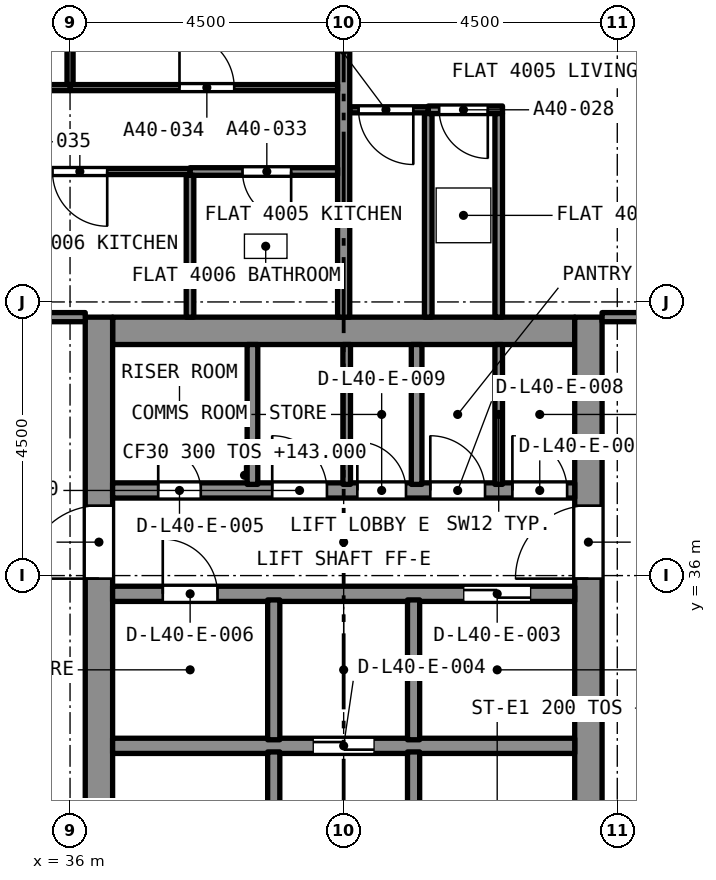
"""IFC4 building model, lengths in metres.
Left out: names, types, materials, properties, quantities, classifications, styles, units other than length and angle.
Written with IfcOpenShell. Run it as: python <this file> out.ifc"""

import sys

from ifc_helpers import new_model, si_unit, direction, frame, frame_2d, origin, place, context, subcontext, project, spatial, rectangle, extrude, element, fill, save


model = new_model("IFC4")
c1 = context("Model", 3, precision=1e-05, world=origin(), true_north=direction((0.0, 1.0)))
c2 = subcontext(c1, "Body", "Model", "MODEL_VIEW")
j1 = project(units=[si_unit("LENGTHUNIT", "METRE"), si_unit("PLANEANGLEUNIT", "RADIAN")], contexts=[c1])
p1 = place(None, origin())
s1 = spatial("IfcSite", under=j1, at=p1, CompositionType="ELEMENT")
p2 = place(p1, origin())
s2 = spatial("IfcBuilding", under=s1, at=p2, CompositionType="ELEMENT")
p3 = place(p2, frame((0.0, 0.0, 143.0)))
s3 = spatial("IfcBuildingStorey", under=s2, at=p3, CompositionType="ELEMENT", Elevation=143.0)
p4 = place(p3, frame((36.7, 40.025, 0.0), z_axis=(0.0, 0.0, 1.0), x_axis=(1.0, 0.0, 0.0)))
e1 = element("IfcWall", 1, at=p4, inside=s3, PredefinedType="SOLIDWALL", context=c2, shape_type="SweptSolid", body=[
    extrude(rectangle(XDim=7.6, YDim=0.45, at=frame_2d((3.8, 0.0))), origin(), (0.0, 0.0, 1.0), 3.2),
])
p5 = place(p3, frame((36.475, 27.25, 0.0), z_axis=(0.0, 0.0, 1.0), x_axis=(0.0, 1.0, 0.0)))
e2 = element("IfcWall", 2, at=p5, inside=s3, PredefinedType="SOLIDWALL", context=c2, shape_type="SweptSolid", body=[
    extrude(rectangle(XDim=13.0, YDim=0.45, at=frame_2d((6.5, 0.0))), origin(), (0.0, 0.0, 1.0), 3.2),
])
p6 = place(p5, frame((8.7, 0.0, 0.0)))
e3 = element("IfcOpeningElement", 3, at=p6, cuts=e2, PredefinedType="OPENING", context=c2, shape_type="SweptSolid", body=[
    extrude(rectangle(XDim=1.2, YDim=2.1, at=frame_2d((0.6, 1.05))), frame((0.0, 0.235, 0.0), z_axis=(0.0, -1.0, 0.0), x_axis=(1.0, 0.0, 0.0)), (0.0, 0.0, 1.0), 0.47),
])
p7 = place(p3, frame((44.525, 27.25, 0.0), z_axis=(0.0, 0.0, 1.0), x_axis=(0.0, 1.0, 0.0)))
e4 = element("IfcWall", 4, at=p7, inside=s3, PredefinedType="SOLIDWALL", context=c2, shape_type="SweptSolid", body=[
    extrude(rectangle(XDim=13.0, YDim=0.45, at=frame_2d((6.5, 0.0))), origin(), (0.0, 0.0, 1.0), 3.2),
])
p8 = place(p7, frame((8.7, 0.0, 0.0)))
e5 = element("IfcOpeningElement", 5, at=p8, cuts=e4, PredefinedType="OPENING", context=c2, shape_type="SweptSolid", body=[
    extrude(rectangle(XDim=1.2, YDim=2.1, at=frame_2d((0.6, 1.05))), frame((0.0, 0.235, 0.0), z_axis=(0.0, -1.0, 0.0), x_axis=(1.0, 0.0, 0.0)), (0.0, 0.0, 1.0), 0.47),
])
p9 = place(p3, frame((43.113, 43.66, 0.0), z_axis=(0.0, 0.0, 1.0), x_axis=(-1.0, 0.0, 0.0)))
e6 = element("IfcWall", 6, at=p9, inside=s3, PredefinedType="PARTITIONING", context=c2, shape_type="SweptSolid", body=[
    extrude(rectangle(XDim=1.222, YDim=0.125, at=frame_2d((0.611, 0.0))), origin(), (0.0, 0.0, 1.0), 2.9),
])
p10 = place(p9, frame((0.242, 0.0, 0.0)))
e7 = element("IfcOpeningElement", 7, at=p10, cuts=e6, PredefinedType="OPENING", context=c2, shape_type="SweptSolid", body=[
    extrude(rectangle(XDim=0.8, YDim=2.1, at=frame_2d((0.4, 1.05))), frame((0.0, 0.073, 0.0), z_axis=(0.0, -1.0, 0.0), x_axis=(1.0, 0.0, 0.0)), (0.0, 0.0, 1.0), 0.145),
])
for number, where, z_axis, x_axis in (
    (8, (43.05, 40.25, 0.0), (0.0, 0.0, 1.0), (0.0, 1.0, 0.0)),
    (9, (41.891, 40.25, 0.0), (0.0, 0.0, 1.0), (0.0, 1.0, 0.0)),
):
    element("IfcWall", number, at=place(p3, frame(where, z_axis=z_axis, x_axis=x_axis)), inside=s3, PredefinedType="PARTITIONING", context=c2, shape_type="SweptSolid", body=[
        extrude(rectangle(XDim=3.347, YDim=0.125, at=frame_2d((1.674, 0.0))), origin(), (0.0, 0.0, 1.0), 2.9),
    ])
p11 = place(p3, frame((41.891, 43.66, 0.0), z_axis=(0.0, 0.0, 1.0), x_axis=(-1.0, 0.0, 0.0)))
e10 = element("IfcWall", 10, at=p11, inside=s3, PredefinedType="PARTITIONING", context=c2, shape_type="SweptSolid", body=[
    extrude(rectangle(XDim=1.291, YDim=0.1, at=frame_2d((0.646, 0.0))), origin(), (0.0, 0.0, 1.0), 2.9),
])
p12 = place(p11, frame((0.246, 0.0, 0.0)))
e11 = element("IfcOpeningElement", 11, at=p12, cuts=e10, PredefinedType="OPENING", context=c2, shape_type="SweptSolid", body=[
    extrude(rectangle(XDim=0.9, YDim=2.1, at=frame_2d((0.45, 1.05))), frame((0.0, 0.06, 0.0), z_axis=(0.0, -1.0, 0.0), x_axis=(1.0, 0.0, 0.0)), (0.0, 0.0, 1.0), 0.12),
])
p13 = place(p3, frame((44.75, 40.25, 0.0), z_axis=(0.0, 0.0, 1.0), x_axis=(1.0, 0.0, 0.0)))
e12 = element("IfcWall", 12, at=p13, inside=s3, PredefinedType="PARTITIONING", context=c2, shape_type="SweptSolid", body=[
    extrude(rectangle(XDim=4.275, YDim=0.15, at=frame_2d((2.137, 0.0))), origin(), (0.0, 0.0, 1.0), 2.9),
])
p14 = place(p13, frame((2.0, 0.0, 0.0)))
e13 = element("IfcOpeningElement", 13, at=p14, cuts=e12, PredefinedType="OPENING", context=c2, shape_type="SweptSolid", body=[
    extrude(rectangle(XDim=1.0, YDim=2.1, at=frame_2d((0.5, 1.05))), frame((0.0, 0.085, 0.0), z_axis=(0.0, -1.0, 0.0), x_axis=(1.0, 0.0, 0.0)), (0.0, 0.0, 1.0), 0.17),
])
p15 = place(p3, frame((40.5, 40.25, 0.0), z_axis=(0.0, 0.0, 1.0), x_axis=(0.0, 1.0, 0.0)))
e14 = element("IfcWall", 14, at=p15, inside=s3, PredefinedType="PARTITIONING", context=c2, shape_type="SweptSolid", body=[
    extrude(rectangle(XDim=8.775, YDim=0.2, at=frame_2d((4.387, 0.0))), origin(), (0.0, 0.0, 1.0), 2.9),
])
p16 = place(p3, frame((40.4, 42.645, 0.0), z_axis=(0.0, 0.0, 1.0), x_axis=(-1.0, 0.0, 0.0)))
e15 = element("IfcWall", 15, at=p16, inside=s3, PredefinedType="PARTITIONING", context=c2, shape_type="SweptSolid", body=[
    extrude(rectangle(XDim=2.427, YDim=0.125, at=frame_2d((1.214, 0.0))), origin(), (0.0, 0.0, 1.0), 2.9),
])
p17 = place(p16, frame((0.764, 0.0, 0.0)))
e16 = element("IfcOpeningElement", 16, at=p17, cuts=e15, PredefinedType="OPENING", context=c2, shape_type="SweptSolid", body=[
    extrude(rectangle(XDim=0.8, YDim=2.1, at=frame_2d((0.4, 1.05))), frame((0.0, 0.073, 0.0), z_axis=(0.0, -1.0, 0.0), x_axis=(1.0, 0.0, 0.0)), (0.0, 0.0, 1.0), 0.145),
])
p18 = place(p3, frame((37.973, 40.25, 0.0), z_axis=(0.0, 0.0, 1.0), x_axis=(0.0, 1.0, 0.0)))
e17 = element("IfcWall", 17, at=p18, inside=s3, PredefinedType="PARTITIONING", context=c2, shape_type="SweptSolid", body=[
    extrude(rectangle(XDim=2.333, YDim=0.125, at=frame_2d((1.166, 0.0))), origin(), (0.0, 0.0, 1.0), 2.9),
])
p19 = place(p3, frame((36.0, 44.025, 0.0), z_axis=(0.0, 0.0, 1.0), x_axis=(1.0, 0.0, 0.0)))
e18 = element("IfcWall", 18, at=p19, inside=s3, PredefinedType="PARTITIONING", context=c2, shape_type="SweptSolid", body=[
    extrude(rectangle(XDim=4.4, YDim=0.1, at=frame_2d((2.2, 0.0))), origin(), (0.0, 0.0, 1.0), 2.9),
])
p20 = place(p19, frame((1.8, 0.0, 0.0)))
e19 = element("IfcOpeningElement", 19, at=p20, cuts=e18, PredefinedType="OPENING", context=c2, shape_type="SweptSolid", body=[
    extrude(rectangle(XDim=0.9, YDim=2.1, at=frame_2d((0.45, 1.05))), frame((0.0, 0.06, 0.0), z_axis=(0.0, -1.0, 0.0), x_axis=(1.0, 0.0, 0.0)), (0.0, 0.0, 1.0), 0.12),
])
p21 = place(p3, frame((36.0, 44.075, 0.0), z_axis=(0.0, 0.0, 1.0), x_axis=(0.0, 1.0, 0.0)))
e20 = element("IfcWall", 20, at=p21, inside=s3, PredefinedType="PARTITIONING", context=c2, shape_type="SweptSolid", body=[
    extrude(rectangle(XDim=4.95, YDim=0.1, at=frame_2d((2.475, 0.0))), origin(), (0.0, 0.0, 1.0), 2.9),
])
p22 = place(p3, frame((37.973, 42.645, 0.0), z_axis=(0.0, 0.0, 1.0), x_axis=(-1.0, 0.0, 0.0)))
e21 = element("IfcWall", 21, at=p22, inside=s3, PredefinedType="PARTITIONING", context=c2, shape_type="SweptSolid", body=[
    extrude(rectangle(XDim=3.673, YDim=0.1, at=frame_2d((1.836, 0.0))), origin(), (0.0, 0.0, 1.0), 2.9),
])
p23 = place(p22, frame((1.361, 0.0, 0.0)))
e22 = element("IfcOpeningElement", 22, at=p23, cuts=e21, PredefinedType="OPENING", context=c2, shape_type="SweptSolid", body=[
    extrude(rectangle(XDim=0.9, YDim=2.1, at=frame_2d((0.45, 1.05))), frame((0.0, 0.06, 0.0), z_axis=(0.0, -1.0, 0.0), x_axis=(1.0, 0.0, 0.0)), (0.0, 0.0, 1.0), 0.12),
])
p24 = place(p3, frame((31.625, 44.025, 0.0), z_axis=(0.0, 0.0, 1.0), x_axis=(1.0, 0.0, 0.0)))
e23 = element("IfcWall", 23, at=p24, inside=s3, PredefinedType="PARTITIONING", context=c2, shape_type="SweptSolid", body=[
    extrude(rectangle(XDim=4.375, YDim=0.1, at=frame_2d((2.188, 0.0))), origin(), (0.0, 0.0, 1.0), 2.9),
])
p25 = place(p24, frame((1.625, 0.0, 0.0)))
e24 = element("IfcOpeningElement", 24, at=p25, cuts=e23, PredefinedType="OPENING", context=c2, shape_type="SweptSolid", body=[
    extrude(rectangle(XDim=1.0, YDim=2.1, at=frame_2d((0.5, 1.05))), frame((0.0, 0.06, 0.0), z_axis=(0.0, -1.0, 0.0), x_axis=(1.0, 0.0, 0.0)), (0.0, 0.0, 1.0), 0.12),
])
p26 = place(p3, frame((34.35, 40.25, 0.0), z_axis=(0.0, 0.0, 1.0), x_axis=(1.0, 0.0, 0.0)))
e25 = element("IfcWall", 25, at=p26, inside=s3, PredefinedType="PARTITIONING", context=c2, shape_type="SweptSolid", body=[
    extrude(rectangle(XDim=1.9, YDim=0.15, at=frame_2d((0.95, 0.0))), origin(), (0.0, 0.0, 1.0), 2.9),
])
p27 = place(p3, frame((36.7, 33.2, 0.0), z_axis=(0.0, 0.0, 1.0), x_axis=(1.0, 0.0, 0.0)))
e26 = element("IfcWall", 26, at=p27, inside=s3, PredefinedType="SOLIDWALL", context=c2, shape_type="SweptSolid", body=[
    extrude(rectangle(XDim=7.6, YDim=0.25, at=frame_2d((3.8, 0.0))), origin(), (0.0, 0.0, 1.0), 2.9),
])
p28 = place(p27, frame((3.3, 0.0, 0.0)))
e27 = element("IfcOpeningElement", 27, at=p28, cuts=e26, PredefinedType="OPENING", context=c2, shape_type="SweptSolid", body=[
    extrude(rectangle(XDim=1.0, YDim=2.1, at=frame_2d((0.5, 1.05))), frame((0.0, 0.135, 0.0), z_axis=(0.0, -1.0, 0.0), x_axis=(1.0, 0.0, 0.0)), (0.0, 0.0, 1.0), 0.27),
])
p29 = place(p3, frame((36.7, 35.7, 0.0), z_axis=(0.0, 0.0, 1.0), x_axis=(1.0, 0.0, 0.0)))
e28 = element("IfcWall", 28, at=p29, inside=s3, PredefinedType="SOLIDWALL", context=c2, shape_type="SweptSolid", body=[
    extrude(rectangle(XDim=7.6, YDim=0.25, at=frame_2d((3.8, 0.0))), origin(), (0.0, 0.0, 1.0), 2.9),
])
p30 = place(p29, frame((5.775, 0.0, 0.0)))
e29 = element("IfcOpeningElement", 29, at=p30, cuts=e28, PredefinedType="OPENING", context=c2, shape_type="SweptSolid", body=[
    extrude(rectangle(XDim=1.1, YDim=2.4, at=frame_2d((0.55, 1.2))), frame((0.0, 0.135, 0.0), z_axis=(0.0, -1.0, 0.0), x_axis=(1.0, 0.0, 0.0)), (0.0, 0.0, 1.0), 0.27),
])
p31 = place(p29, frame((0.825, 0.0, 0.0)))
e30 = element("IfcOpeningElement", 30, at=p31, cuts=e28, PredefinedType="OPENING", context=c2, shape_type="SweptSolid", body=[
    extrude(rectangle(XDim=0.9, YDim=2.1, at=frame_2d((0.45, 1.05))), frame((0.0, 0.135, 0.0), z_axis=(0.0, -1.0, 0.0), x_axis=(1.0, 0.0, 0.0)), (0.0, 0.0, 1.0), 0.27),
])
p32 = place(p3, frame((36.7, 37.4, 0.0), z_axis=(0.0, 0.0, 1.0), x_axis=(1.0, 0.0, 0.0)))
e31 = element("IfcWall", 31, at=p32, inside=s3, PredefinedType="SOLIDWALL", context=c2, shape_type="SweptSolid", body=[
    extrude(rectangle(XDim=7.6, YDim=0.25, at=frame_2d((3.8, 0.0))), origin(), (0.0, 0.0, 1.0), 2.9),
])
p33 = place(p32, frame((0.75, 0.0, 0.0)))
e32 = element("IfcOpeningElement", 32, at=p33, cuts=e31, PredefinedType="OPENING", context=c2, shape_type="SweptSolid", body=[
    extrude(rectangle(XDim=0.7, YDim=2.1, at=frame_2d((0.35, 1.05))), frame((0.0, 0.135, 0.0), z_axis=(0.0, -1.0, 0.0), x_axis=(1.0, 0.0, 0.0)), (0.0, 0.0, 1.0), 0.27),
])
p34 = place(p32, frame((6.575, 0.0, 0.0)))
e33 = element("IfcOpeningElement", 33, at=p34, cuts=e31, PredefinedType="OPENING", context=c2, shape_type="SweptSolid", body=[
    extrude(rectangle(XDim=0.9, YDim=2.1, at=frame_2d((0.45, 1.05))), frame((0.0, 0.135, 0.0), z_axis=(0.0, -1.0, 0.0), x_axis=(1.0, 0.0, 0.0)), (0.0, 0.0, 1.0), 0.27),
])
p35 = place(p32, frame((5.225, 0.0, 0.0)))
e34 = element("IfcOpeningElement", 34, at=p35, cuts=e31, PredefinedType="OPENING", context=c2, shape_type="SweptSolid", body=[
    extrude(rectangle(XDim=0.9, YDim=2.1, at=frame_2d((0.45, 1.05))), frame((0.0, 0.135, 0.0), z_axis=(0.0, -1.0, 0.0), x_axis=(1.0, 0.0, 0.0)), (0.0, 0.0, 1.0), 0.27),
])
p36 = place(p32, frame((4.025, 0.0, 0.0)))
e35 = element("IfcOpeningElement", 35, at=p36, cuts=e31, PredefinedType="OPENING", context=c2, shape_type="SweptSolid", body=[
    extrude(rectangle(XDim=0.8, YDim=2.1, at=frame_2d((0.4, 1.05))), frame((0.0, 0.135, 0.0), z_axis=(0.0, -1.0, 0.0), x_axis=(1.0, 0.0, 0.0)), (0.0, 0.0, 1.0), 0.27),
])
p37 = place(p32, frame((2.625, 0.0, 0.0)))
e36 = element("IfcOpeningElement", 36, at=p37, cuts=e31, PredefinedType="OPENING", context=c2, shape_type="SweptSolid", body=[
    extrude(rectangle(XDim=0.9, YDim=2.1, at=frame_2d((0.45, 1.05))), frame((0.0, 0.135, 0.0), z_axis=(0.0, -1.0, 0.0), x_axis=(1.0, 0.0, 0.0)), (0.0, 0.0, 1.0), 0.27),
])
p38 = place(p3, frame((41.65, 27.7, 0.0), z_axis=(0.0, 0.0, 1.0), x_axis=(0.0, 1.0, 0.0)))
e37 = element("IfcWall", 37, at=p38, inside=s3, PredefinedType="SOLIDWALL", context=c2, shape_type="SweptSolid", body=[
    extrude(rectangle(XDim=5.4, YDim=0.2, at=frame_2d((2.7, 0.0))), origin(), (0.0, 0.0, 1.0), 2.9),
])
p39 = place(p38, frame((0.2, 0.0, 0.0)))
e38 = element("IfcOpeningElement", 38, at=p39, cuts=e37, PredefinedType="OPENING", context=c2, shape_type="SweptSolid", body=[
    extrude(rectangle(XDim=0.9, YDim=2.1, at=frame_2d((0.45, 1.05))), frame((0.0, 0.11, 0.0), z_axis=(0.0, -1.0, 0.0), x_axis=(1.0, 0.0, 0.0)), (0.0, 0.0, 1.0), 0.22),
])
p40 = place(p3, frame((39.35, 27.7, 0.0), z_axis=(0.0, 0.0, 1.0), x_axis=(0.0, 1.0, 0.0)))
e39 = element("IfcWall", 39, at=p40, inside=s3, PredefinedType="SOLIDWALL", context=c2, shape_type="SweptSolid", body=[
    extrude(rectangle(XDim=5.4, YDim=0.2, at=frame_2d((2.7, 0.0))), origin(), (0.0, 0.0, 1.0), 2.9),
])
p41 = place(p40, frame((0.2, 0.0, 0.0)))
e40 = element("IfcOpeningElement", 40, at=p41, cuts=e39, PredefinedType="OPENING", context=c2, shape_type="SweptSolid", body=[
    extrude(rectangle(XDim=0.9, YDim=2.1, at=frame_2d((0.45, 1.05))), frame((0.0, 0.11, 0.0), z_axis=(0.0, -1.0, 0.0), x_axis=(1.0, 0.0, 0.0)), (0.0, 0.0, 1.0), 0.22),
])
for number, where, z_axis, x_axis in (
    (41, (41.65, 33.3, 0.0), (0.0, 0.0, 1.0), (0.0, 1.0, 0.0)),
    (42, (39.35, 33.3, 0.0), (0.0, 0.0, 1.0), (0.0, 1.0, 0.0)),
):
    element("IfcWall", number, at=place(p3, frame(where, z_axis=z_axis, x_axis=x_axis)), inside=s3, PredefinedType="SOLIDWALL", context=c2, shape_type="SweptSolid", body=[
        extrude(rectangle(XDim=2.3, YDim=0.2, at=frame_2d((1.15, 0.0))), origin(), (0.0, 0.0, 1.0), 2.9),
    ])
for number, where, z_axis, x_axis in (
    (43, (41.7, 37.5, 0.0), (0.0, 0.0, 1.0), (0.0, 1.0, 0.0)),
    (44, (39.0, 37.5, 0.0), (0.0, 0.0, 1.0), (0.0, 1.0, 0.0)),
):
    element("IfcWall", number, at=place(p3, frame(where, z_axis=z_axis, x_axis=x_axis)), inside=s3, PredefinedType="SOLIDWALL", context=c2, shape_type="SweptSolid", body=[
        extrude(rectangle(XDim=2.3, YDim=0.175, at=frame_2d((1.15, 0.0))), origin(), (0.0, 0.0, 1.0), 2.9),
    ])
for number, where, z_axis, x_axis in (
    (45, (43.05, 37.5, 0.0), (0.0, 0.0, 1.0), (0.0, 1.0, 0.0)),
    (46, (40.55, 37.5, 0.0), (0.0, 0.0, 1.0), (0.0, 1.0, 0.0)),
):
    element("IfcWall", number, at=place(p3, frame(where, z_axis=z_axis, x_axis=x_axis)), inside=s3, PredefinedType="PARTITIONING", context=c2, shape_type="SweptSolid", body=[
        extrude(rectangle(XDim=2.3, YDim=0.125, at=frame_2d((1.15, 0.0))), origin(), (0.0, 0.0, 1.0), 2.9),
    ])
p42 = place(p10, origin())
e47 = element("IfcDoor", 47, at=p42, inside=s3, OperationType="SINGLE_SWING_RIGHT", PredefinedType="DOOR", context=c2, shape_type="SweptSolid", body=[
    extrude(rectangle(XDim=0.8, YDim=2.1, at=frame_2d((0.4, 1.05))), frame((0.0, 0.025, 0.0), z_axis=(0.0, -1.0, 0.0), x_axis=(1.0, 0.0, 0.0)), (0.0, 0.0, 1.0), 0.05),
])
fill(e7, e47)
p43 = place(p12, origin())
e48 = element("IfcDoor", 48, at=p43, inside=s3, OperationType="SINGLE_SWING_RIGHT", PredefinedType="DOOR", context=c2, shape_type="SweptSolid", body=[
    extrude(rectangle(XDim=0.9, YDim=2.1, at=frame_2d((0.45, 1.05))), frame((0.0, 0.025, 0.0), z_axis=(0.0, -1.0, 0.0), x_axis=(1.0, 0.0, 0.0)), (0.0, 0.0, 1.0), 0.05),
])
fill(e11, e48)
p44 = place(p17, origin())
e49 = element("IfcDoor", 49, at=p44, inside=s3, OperationType="SINGLE_SWING_LEFT", PredefinedType="DOOR", context=c2, shape_type="SweptSolid", body=[
    extrude(rectangle(XDim=0.8, YDim=2.1, at=frame_2d((0.4, 1.05))), frame((0.0, 0.025, 0.0), z_axis=(0.0, -1.0, 0.0), x_axis=(1.0, 0.0, 0.0)), (0.0, 0.0, 1.0), 0.05),
])
fill(e16, e49)
p45 = place(p20, origin())
e50 = element("IfcDoor", 50, at=p45, inside=s3, OperationType="SINGLE_SWING_RIGHT", PredefinedType="DOOR", context=c2, shape_type="SweptSolid", body=[
    extrude(rectangle(XDim=0.9, YDim=2.1, at=frame_2d((0.45, 1.05))), frame((0.0, 0.025, 0.0), z_axis=(0.0, -1.0, 0.0), x_axis=(1.0, 0.0, 0.0)), (0.0, 0.0, 1.0), 0.05),
])
fill(e19, e50)
p46 = place(p23, origin())
e51 = element("IfcDoor", 51, at=p46, inside=s3, OperationType="SINGLE_SWING_LEFT", PredefinedType="DOOR", context=c2, shape_type="SweptSolid", body=[
    extrude(rectangle(XDim=0.9, YDim=2.1, at=frame_2d((0.45, 1.05))), frame((0.0, 0.025, 0.0), z_axis=(0.0, -1.0, 0.0), x_axis=(1.0, 0.0, 0.0)), (0.0, 0.0, 1.0), 0.05),
])
fill(e22, e51)
p47 = place(p30, origin())
e52 = element("IfcDoor", 52, at=p47, inside=s3, OperationType="SLIDING_TO_LEFT", PredefinedType="DOOR", context=c2, shape_type="SweptSolid", body=[
    extrude(rectangle(XDim=1.1, YDim=2.4, at=frame_2d((0.55, 1.2))), frame((0.0, 0.025, 0.0), z_axis=(0.0, -1.0, 0.0), x_axis=(1.0, 0.0, 0.0)), (0.0, 0.0, 1.0), 0.05),
])
fill(e29, e52)
p48 = place(p28, origin())
e53 = element("IfcDoor", 53, at=p48, inside=s3, OperationType="SLIDING_TO_LEFT", PredefinedType="DOOR", context=c2, shape_type="SweptSolid", body=[
    extrude(rectangle(XDim=1.0, YDim=2.1, at=frame_2d((0.5, 1.05))), frame((0.0, 0.025, 0.0), z_axis=(0.0, -1.0, 0.0), x_axis=(1.0, 0.0, 0.0)), (0.0, 0.0, 1.0), 0.05),
])
fill(e27, e53)
p49 = place(p33, origin())
e54 = element("IfcDoor", 54, at=p49, inside=s3, OperationType="SINGLE_SWING_LEFT", PredefinedType="DOOR", context=c2, shape_type="SweptSolid", body=[
    extrude(rectangle(XDim=0.7, YDim=2.1, at=frame_2d((0.35, 1.05))), frame((0.0, 0.025, 0.0), z_axis=(0.0, -1.0, 0.0), x_axis=(1.0, 0.0, 0.0)), (0.0, 0.0, 1.0), 0.05),
])
fill(e32, e54)
p50 = place(p31, origin())
e55 = element("IfcDoor", 55, at=p50, inside=s3, OperationType="SINGLE_SWING_LEFT", PredefinedType="DOOR", context=c2, shape_type="SweptSolid", body=[
    extrude(rectangle(XDim=0.9, YDim=2.1, at=frame_2d((0.45, 1.05))), frame((0.0, 0.025, 0.0), z_axis=(0.0, -1.0, 0.0), x_axis=(1.0, 0.0, 0.0)), (0.0, 0.0, 1.0), 0.05),
])
fill(e30, e55)
p51 = place(p34, origin())
e56 = element("IfcDoor", 56, at=p51, inside=s3, OperationType="SINGLE_SWING_LEFT", PredefinedType="DOOR", context=c2, shape_type="SweptSolid", body=[
    extrude(rectangle(XDim=0.9, YDim=2.1, at=frame_2d((0.45, 1.05))), frame((0.0, 0.025, 0.0), z_axis=(0.0, -1.0, 0.0), x_axis=(1.0, 0.0, 0.0)), (0.0, 0.0, 1.0), 0.05),
])
fill(e33, e56)
p52 = place(p35, origin())
e57 = element("IfcDoor", 57, at=p52, inside=s3, OperationType="SINGLE_SWING_LEFT", PredefinedType="DOOR", context=c2, shape_type="SweptSolid", body=[
    extrude(rectangle(XDim=0.9, YDim=2.1, at=frame_2d((0.45, 1.05))), frame((0.0, 0.025, 0.0), z_axis=(0.0, -1.0, 0.0), x_axis=(1.0, 0.0, 0.0)), (0.0, 0.0, 1.0), 0.05),
])
fill(e34, e57)
p53 = place(p36, origin())
e58 = element("IfcDoor", 58, at=p53, inside=s3, OperationType="SINGLE_SWING_LEFT", PredefinedType="DOOR", context=c2, shape_type="SweptSolid", body=[
    extrude(rectangle(XDim=0.8, YDim=2.1, at=frame_2d((0.4, 1.05))), frame((0.0, 0.025, 0.0), z_axis=(0.0, -1.0, 0.0), x_axis=(1.0, 0.0, 0.0)), (0.0, 0.0, 1.0), 0.05),
])
fill(e35, e58)
p54 = place(p37, origin())
e59 = element("IfcDoor", 59, at=p54, inside=s3, OperationType="SINGLE_SWING_LEFT", PredefinedType="DOOR", context=c2, shape_type="SweptSolid", body=[
    extrude(rectangle(XDim=0.9, YDim=2.1, at=frame_2d((0.45, 1.05))), frame((0.0, 0.025, 0.0), z_axis=(0.0, -1.0, 0.0), x_axis=(1.0, 0.0, 0.0)), (0.0, 0.0, 1.0), 0.05),
])
fill(e36, e59)
p55 = place(p6, origin())
e60 = element("IfcDoor", 60, at=p55, inside=s3, OperationType="SINGLE_SWING_LEFT", PredefinedType="DOOR", context=c2, shape_type="SweptSolid", body=[
    extrude(rectangle(XDim=1.2, YDim=2.1, at=frame_2d((0.6, 1.05))), frame((0.0, 0.025, 0.0), z_axis=(0.0, -1.0, 0.0), x_axis=(1.0, 0.0, 0.0)), (0.0, 0.0, 1.0), 0.05),
])
fill(e3, e60)
p56 = place(p8, origin())
e61 = element("IfcDoor", 61, at=p56, inside=s3, OperationType="SINGLE_SWING_LEFT", PredefinedType="DOOR", context=c2, shape_type="SweptSolid", body=[
    extrude(rectangle(XDim=1.2, YDim=2.1, at=frame_2d((0.6, 1.05))), frame((0.0, 0.025, 0.0), z_axis=(0.0, -1.0, 0.0), x_axis=(1.0, 0.0, 0.0)), (0.0, 0.0, 1.0), 0.05),
])
fill(e5, e61)
save(model, sys.argv[1])
